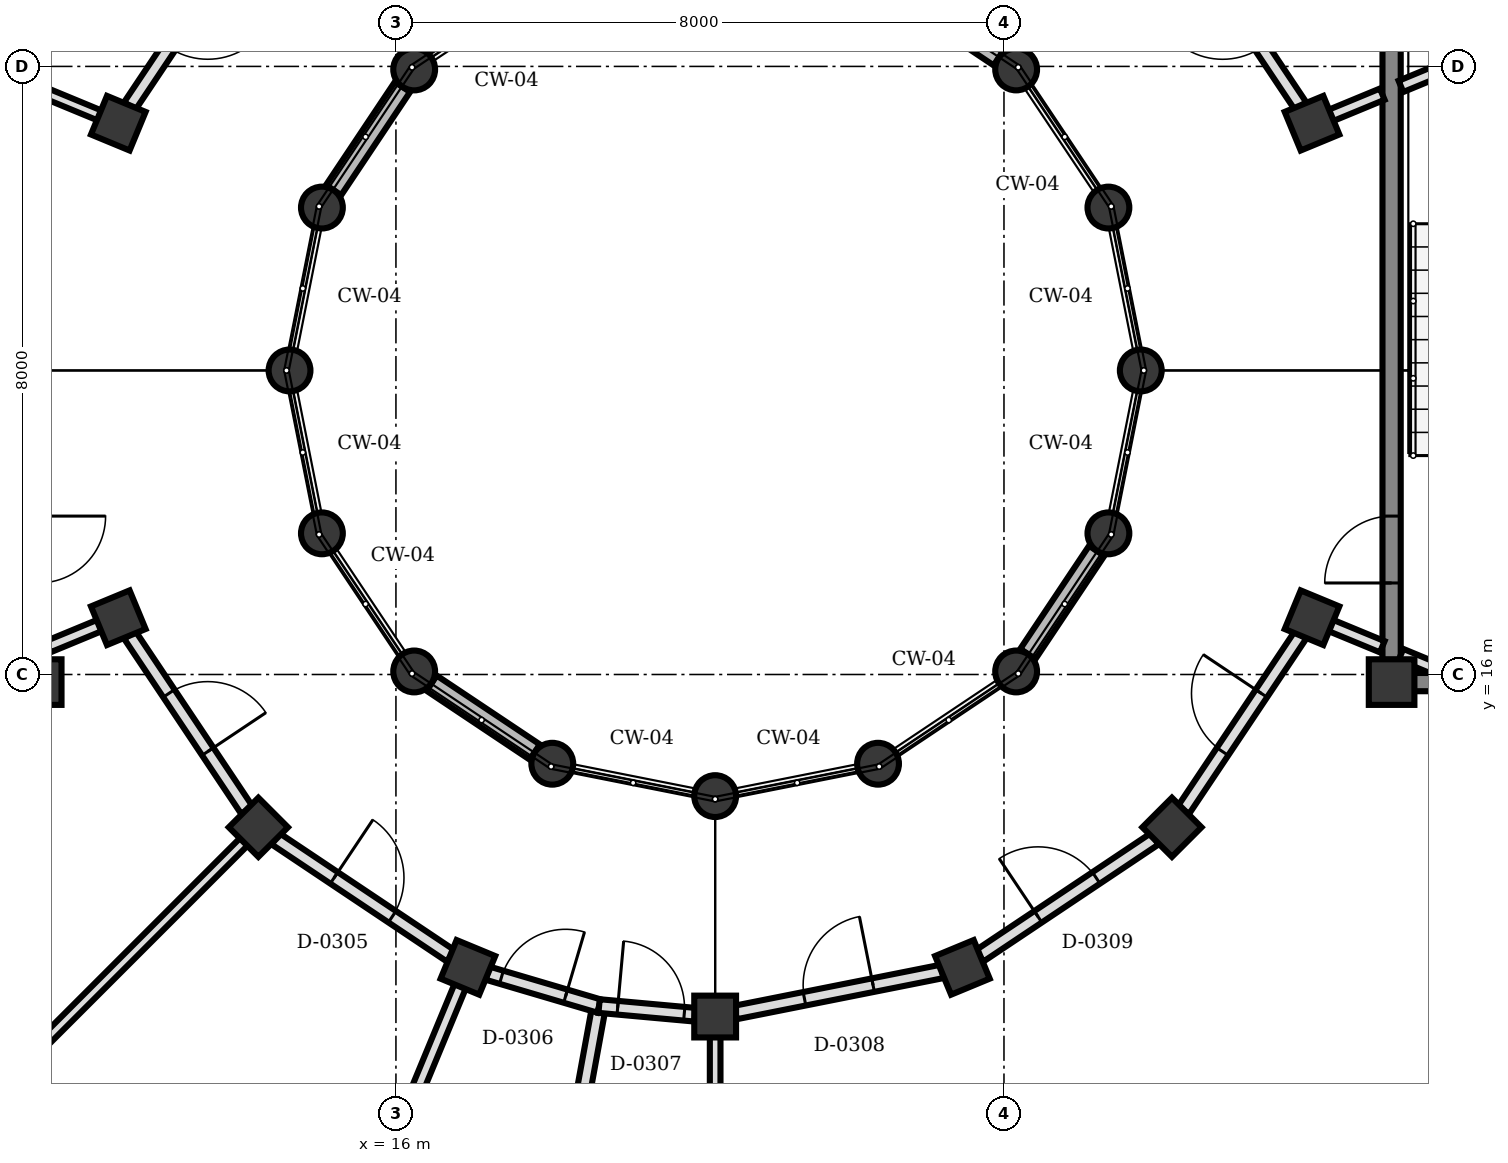
"""IFC4 building model, lengths in metres.
Left out: names, types, materials, properties, quantities, classifications, styles, units other than length and angle.
Written with IfcOpenShell. Run it as: python <this file> out.ifc"""

import sys

from ifc_helpers import new_model, si_unit, direction, frame, frame_2d, origin, origin_2d, place, context, subcontext, project, spatial, rectangle, circle, extrude, element, fill, save


model = new_model("IFC4")
c1 = context("Model", 3, precision=1e-05, world=origin(), true_north=direction((0.0, 1.0)))
c2 = subcontext(c1, "Body", "Model", "MODEL_VIEW")
j1 = project(units=[si_unit("LENGTHUNIT", "METRE"), si_unit("PLANEANGLEUNIT", "RADIAN")], contexts=[c1])
p1 = place(None, origin())
s1 = spatial("IfcSite", under=j1, at=p1, CompositionType="ELEMENT")
p2 = place(p1, origin())
s2 = spatial("IfcBuilding", under=s1, at=p2, CompositionType="ELEMENT")
p3 = place(p2, frame((0.0, 0.0, 8.5)))
s3 = spatial("IfcBuildingStorey", under=s2, at=p3, CompositionType="ELEMENT", Elevation=8.5)
for number, where, z_axis, x_axis in (
    (1, (11.3, 15.9, 0.0), (0.0, 0.0, 1.0), (1.0, 0.0, 0.0)),
    (2, (29.1, 15.9, 0.0), (0.0, 0.0, 1.0), (1.0, 0.0, 0.0)),
):
    element("IfcColumn", number, at=place(p3, frame(where, z_axis=z_axis, x_axis=x_axis)), inside=s3, PredefinedType="COLUMN", context=c2, shape_type="SweptSolid", body=[
        extrude(rectangle(XDim=0.6, YDim=0.6, at=origin_2d()), origin(), (0.0, 0.0, 1.0), 4.0),
    ])
for number, where, z_axis, x_axis in (
    (3, (25.8, 20.0, 0.0), (0.0, 0.0, 1.0), (1.0, 0.0, 0.0)),
    (4, (25.374, 22.143, 0.0), (0.0, 0.0, 1.0), (1.0, 0.0, 0.0)),
    (5, (24.16, 23.96, 0.0), (0.0, 0.0, 1.0), (1.0, 0.0, 0.0)),
    (6, (16.24, 23.96, 0.0), (0.0, 0.0, 1.0), (1.0, 0.0, 0.0)),
    (7, (15.026, 22.143, 0.0), (0.0, 0.0, 1.0), (1.0, 0.0, 0.0)),
    (8, (14.6, 20.0, 0.0), (0.0, 0.0, 1.0), (1.0, 0.0, 0.0)),
    (9, (15.026, 17.857, 0.0), (0.0, 0.0, 1.0), (1.0, 0.0, 0.0)),
    (10, (16.24, 16.04, 0.0), (0.0, 0.0, 1.0), (1.0, 0.0, 0.0)),
    (11, (18.057, 14.826, 0.0), (0.0, 0.0, 1.0), (1.0, 0.0, 0.0)),
    (12, (20.2, 14.4, 0.0), (0.0, 0.0, 1.0), (1.0, 0.0, 0.0)),
    (13, (22.343, 14.826, 0.0), (0.0, 0.0, 1.0), (1.0, 0.0, 0.0)),
    (14, (24.16, 16.04, 0.0), (0.0, 0.0, 1.0), (1.0, 0.0, 0.0)),
    (15, (25.374, 17.857, 0.0), (0.0, 0.0, 1.0), (1.0, 0.0, 0.0)),
):
    element("IfcColumn", number, at=place(p3, frame(where, z_axis=z_axis, x_axis=x_axis)), inside=s3, PredefinedType="COLUMN", context=c2, shape_type="SweptSolid", body=[
        extrude(circle(Radius=0.275, at=origin_2d()), origin(), (0.0, 0.0, 1.0), 4.0),
    ])
for number, where, z_axis, x_axis in (
    (16, (28.053, 23.253, 0.0), (0.0, 0.0, 1.0), (0.924, 0.383, 0.0)),
    (17, (12.347, 23.253, 0.0), (0.0, 0.0, 1.0), (-0.924, 0.383, 0.0)),
    (18, (12.347, 16.747, 0.0), (0.0, 0.0, 1.0), (-0.924, -0.383, 0.0)),
    (19, (14.19, 13.99, 0.0), (0.0, 0.0, 1.0), (-0.707, -0.707, 0.0)),
    (20, (16.947, 12.147, 0.0), (0.0, 0.0, 1.0), (-0.383, -0.924, 0.0)),
    (21, (20.2, 11.5, 0.0), (0.0, 0.0, 1.0), (0.0, -1.0, 0.0)),
    (22, (23.453, 12.147, 0.0), (0.0, 0.0, 1.0), (0.383, -0.924, 0.0)),
    (23, (26.21, 13.99, 0.0), (0.0, 0.0, 1.0), (0.707, -0.707, 0.0)),
    (24, (28.053, 16.747, 0.0), (0.0, 0.0, 1.0), (0.924, -0.383, 0.0)),
):
    element("IfcColumn", number, at=place(p3, frame(where, z_axis=z_axis, x_axis=x_axis)), inside=s3, PredefinedType="COLUMN", context=c2, shape_type="SweptSolid", body=[
        extrude(rectangle(XDim=0.55, YDim=0.55, at=origin_2d()), origin(), (0.0, 0.0, 1.0), 4.0),
    ])
for number, where, z_axis, x_axis in (
    (25, (23.93, 24.114, 0.0), (0.0, 0.0, 1.0), (-0.832, 0.555, 0.0)),
    (26, (16.086, 23.73, 0.0), (0.0, 0.0, 1.0), (-0.555, -0.832, 0.0)),
    (27, (16.47, 15.886, 0.0), (0.0, 0.0, 1.0), (0.832, -0.555, 0.0)),
    (28, (24.314, 16.27, 0.0), (0.0, 0.0, 1.0), (0.555, 0.832, 0.0)),
):
    element("IfcWall", number, at=place(p3, frame(where, z_axis=z_axis, x_axis=x_axis)), inside=s3, PredefinedType="SOLIDWALL", context=c2, shape_type="SweptSolid", body=[
        extrude(rectangle(XDim=1.632, YDim=0.24, at=frame_2d((0.816, 0.0))), origin(), (0.0, 0.0, 1.0), 3.222),
    ])
p4 = place(p3, frame((29.1, 16.192, 0.0), z_axis=(0.0, 0.0, 1.0), x_axis=(0.0, 1.0, 0.0)))
e29 = element("IfcWall", 29, at=p4, inside=s3, PredefinedType="SHEAR", context=c2, shape_type="SweptSolid", body=[
    extrude(rectangle(XDim=8.136, YDim=0.24, at=frame_2d((4.068, 0.0))), origin(), (0.0, 0.0, 1.0), 3.74),
])
p5 = place(p4, frame((1.012, 0.0, 0.0)))
e30 = element("IfcOpeningElement", 30, at=p5, cuts=e29, PredefinedType="OPENING", context=c2, shape_type="SweptSolid", body=[
    extrude(rectangle(XDim=0.88, YDim=2.1, at=frame_2d((0.44, 1.05))), frame((0.0, 0.13, 0.0), z_axis=(0.0, -1.0, 0.0), x_axis=(1.0, 0.0, 0.0)), (0.0, 0.0, 1.0), 0.26),
])
p6 = place(p3, frame((33.608, 15.9, 0.0), z_axis=(0.0, 0.0, 1.0), x_axis=(-1.0, 0.0, 0.0)))
e31 = element("IfcWall", 31, at=p6, inside=s3, PredefinedType="SHEAR", context=c2, shape_type="SweptSolid", body=[
    extrude(rectangle(XDim=4.216, YDim=0.24, at=frame_2d((2.108, 0.0))), origin(), (0.0, 0.0, 1.0), 3.74),
])
p7 = place(p3, frame((28.3, 23.355, 0.0), z_axis=(0.0, 0.0, 1.0), x_axis=(0.924069600435, 0.382224245113, 0.0)))
e32 = element("IfcWall", 32, at=p7, inside=s3, PredefinedType="PARTITIONING", context=c2, shape_type="SweptSolid", body=[
    extrude(rectangle(XDim=0.733, YDim=0.16, at=frame_2d((0.366, 0.0))), origin(), (0.0, 0.0, 1.0), 3.7),
])
p8 = place(p3, frame((29.223, 23.737, 0.0), z_axis=(0.0, 0.0, 1.0), x_axis=(0.923817443679, 0.382833293686, 0.0)))
e33 = element("IfcWall", 33, at=p8, inside=s3, PredefinedType="PARTITIONING", context=c2, shape_type="SweptSolid", body=[
    extrude(rectangle(XDim=1.985, YDim=0.16, at=frame_2d((0.993, 0.0))), origin(), (0.0, 0.0, 1.0), 3.7),
])
p9 = place(p3, frame((12.1, 23.355, 0.0), z_axis=(0.0, 0.0, 1.0), x_axis=(-0.924069600435, 0.382224245113, 0.0)))
e34 = element("IfcWall", 34, at=p9, inside=s3, PredefinedType="PARTITIONING", context=c2, shape_type="SweptSolid", body=[
    extrude(rectangle(XDim=0.733, YDim=0.14, at=frame_2d((0.366, 0.0))), origin(), (0.0, 0.0, 1.0), 3.7),
])
p10 = place(p3, frame((12.1, 16.645, 0.0), z_axis=(0.0, 0.0, 1.0), x_axis=(-0.924069600435, -0.382224245113, 0.0)))
e35 = element("IfcWall", 35, at=p10, inside=s3, PredefinedType="PARTITIONING", context=c2, shape_type="SweptSolid", body=[
    extrude(rectangle(XDim=0.733, YDim=0.16, at=frame_2d((0.366, 0.0))), origin(), (0.0, 0.0, 1.0), 3.072),
])
p11 = place(p3, frame((14.001, 13.801, 0.0), z_axis=(0.0, 0.0, 1.0), x_axis=(-0.707106781187, -0.707106781187, 0.0)))
e36 = element("IfcWall", 36, at=p11, inside=s3, PredefinedType="PARTITIONING", context=c2, shape_type="SweptSolid", body=[
    extrude(rectangle(XDim=8.441, YDim=0.14, at=frame_2d((4.221, 0.0))), origin(), (0.0, 0.0, 1.0), 3.072),
])
p12 = place(p3, frame((16.845, 11.9, 0.0), z_axis=(0.0, 0.0, 1.0), x_axis=(-0.382683896966, -0.923879340067, 0.0)))
e37 = element("IfcWall", 37, at=p12, inside=s3, PredefinedType="PARTITIONING", context=c2, shape_type="SweptSolid", body=[
    extrude(rectangle(XDim=8.44, YDim=0.16, at=frame_2d((4.22, 0.0))), origin(), (0.0, 0.0, 1.0), 3.072),
])
p13 = place(p3, frame((20.2, 11.233, 0.0), z_axis=(0.0, 0.0, 1.0), x_axis=(0.0, -1.0, 0.0)))
e38 = element("IfcWall", 38, at=p13, inside=s3, PredefinedType="PARTITIONING", context=c2, shape_type="SweptSolid", body=[
    extrude(rectangle(XDim=8.441, YDim=0.14, at=frame_2d((4.22, 0.0))), origin(), (0.0, 0.0, 1.0), 3.072),
])
p14 = place(p3, frame((28.3, 16.645, 0.0), z_axis=(0.0, 0.0, 1.0), x_axis=(0.924069600435, -0.382224245113, 0.0)))
e39 = element("IfcWall", 39, at=p14, inside=s3, PredefinedType="PARTITIONING", context=c2, shape_type="SweptSolid", body=[
    extrude(rectangle(XDim=0.733, YDim=0.16, at=frame_2d((0.366, 0.0))), origin(), (0.0, 0.0, 1.0), 3.072),
])
p15 = place(p3, frame((29.223, 16.263, 0.0), z_axis=(0.0, 0.0, 1.0), x_axis=(0.923812676193, -0.382844797933, 0.0)))
e40 = element("IfcWall", 40, at=p15, inside=s3, PredefinedType="PARTITIONING", context=c2, shape_type="SweptSolid", body=[
    extrude(rectangle(XDim=0.627, YDim=0.16, at=frame_2d((0.313, 0.0))), origin(), (0.0, 0.0, 1.0), 3.072),
])
p16 = place(p3, frame((18.673, 11.638, 0.0), z_axis=(0.0, 0.0, 1.0), x_axis=(-0.179734485707, -0.983715159306, 0.0)))
e41 = element("IfcWall", 41, at=p16, inside=s3, PredefinedType="PARTITIONING", context=c2, shape_type="SweptSolid", body=[
    extrude(rectangle(XDim=8.552, YDim=0.18, at=frame_2d((4.276, 0.0))), origin(), (0.0, 0.0, 1.0), 3.072),
])
p17 = place(p3, frame((27.902, 23.479, 0.0), z_axis=(0.0, 0.0, 1.0), x_axis=(-0.555797002478, 0.831318045056, 0.0)))
e42 = element("IfcWall", 42, at=p17, inside=s3, PredefinedType="PARTITIONING", context=c2, shape_type="SweptSolid", body=[
    extrude(rectangle(XDim=2.773, YDim=0.18, at=frame_2d((1.386, 0.0))), origin(), (0.0, 0.0, 1.0), 3.072),
])
p18 = place(p17, frame((0.926, 0.0, 0.0)))
e43 = element("IfcOpeningElement", 43, at=p18, cuts=e42, PredefinedType="OPENING", context=c2, shape_type="SweptSolid", body=[
    extrude(rectangle(XDim=0.92, YDim=2.1, at=frame_2d((0.46, 1.05))), frame((0.0, 0.1, 0.0), z_axis=(0.0, -1.0, 0.0), x_axis=(1.0, 0.0, 0.0)), (0.0, 0.0, 1.0), 0.2),
])
p19 = place(p3, frame((14.039, 25.784, 0.0), z_axis=(0.0, 0.0, 1.0), x_axis=(-0.555797002478, -0.831318045056, 0.0)))
e44 = element("IfcWall", 44, at=p19, inside=s3, PredefinedType="PARTITIONING", context=c2, shape_type="SweptSolid", body=[
    extrude(rectangle(XDim=2.773, YDim=0.18, at=frame_2d((1.386, 0.0))), origin(), (0.0, 0.0, 1.0), 3.072),
])
p20 = place(p19, frame((0.926, 0.0, 0.0)))
e45 = element("IfcOpeningElement", 45, at=p20, cuts=e44, PredefinedType="OPENING", context=c2, shape_type="SweptSolid", body=[
    extrude(rectangle(XDim=0.92, YDim=2.1, at=frame_2d((0.46, 1.05))), frame((0.0, 0.1, 0.0), z_axis=(0.0, -1.0, 0.0), x_axis=(1.0, 0.0, 0.0)), (0.0, 0.0, 1.0), 0.2),
])
p21 = place(p3, frame((12.498, 16.521, 0.0), z_axis=(0.0, 0.0, 1.0), x_axis=(0.555797002478, -0.831318045056, 0.0)))
e46 = element("IfcWall", 46, at=p21, inside=s3, PredefinedType="PARTITIONING", context=c2, shape_type="SweptSolid", body=[
    extrude(rectangle(XDim=2.773, YDim=0.18, at=frame_2d((1.386, 0.0))), origin(), (0.0, 0.0, 1.0), 3.072),
])
p22 = place(p21, frame((0.926, 0.0, 0.0)))
e47 = element("IfcOpeningElement", 47, at=p22, cuts=e46, PredefinedType="OPENING", context=c2, shape_type="SweptSolid", body=[
    extrude(rectangle(XDim=0.92, YDim=2.1, at=frame_2d((0.46, 1.05))), frame((0.0, 0.1, 0.0), z_axis=(0.0, -1.0, 0.0), x_axis=(1.0, 0.0, 0.0)), (0.0, 0.0, 1.0), 0.2),
])
p23 = place(p3, frame((14.416, 13.839, 0.0), z_axis=(0.0, 0.0, 1.0), x_axis=(0.831318045056, -0.555797002478, 0.0)))
e48 = element("IfcWall", 48, at=p23, inside=s3, PredefinedType="PARTITIONING", context=c2, shape_type="SweptSolid", body=[
    extrude(rectangle(XDim=2.773, YDim=0.18, at=frame_2d((1.386, 0.0))), origin(), (0.0, 0.0, 1.0), 3.072),
])
p24 = place(p23, frame((0.926, 0.0, 0.0)))
e49 = element("IfcOpeningElement", 49, at=p24, cuts=e48, PredefinedType="OPENING", context=c2, shape_type="SweptSolid", body=[
    extrude(rectangle(XDim=0.92, YDim=2.1, at=frame_2d((0.46, 1.05))), frame((0.0, 0.1, 0.0), z_axis=(0.0, -1.0, 0.0), x_axis=(1.0, 0.0, 0.0)), (0.0, 0.0, 1.0), 0.2),
])
p25 = place(p3, frame((17.205, 12.071, 0.0), z_axis=(0.0, 0.0, 1.0), x_axis=(0.959128949513, -0.282969359128, 0.0)))
e50 = element("IfcWall", 50, at=p25, inside=s3, PredefinedType="PARTITIONING", context=c2, shape_type="SweptSolid", body=[
    extrude(rectangle(XDim=1.531, YDim=0.18, at=frame_2d((0.765, 0.0))), origin(), (0.0, 0.0, 1.0), 3.072),
])
p26 = place(p25, frame((0.191, 0.0, 0.0)))
e51 = element("IfcOpeningElement", 51, at=p26, cuts=e50, PredefinedType="OPENING", context=c2, shape_type="SweptSolid", body=[
    extrude(rectangle(XDim=0.88, YDim=2.1, at=frame_2d((0.44, 1.05))), frame((0.0, 0.1, 0.0), z_axis=(0.0, -1.0, 0.0), x_axis=(1.0, 0.0, 0.0)), (0.0, 0.0, 1.0), 0.2),
])
p27 = place(p3, frame((18.673, 11.638, 0.0), z_axis=(0.0, 0.0, 1.0), x_axis=(0.995931080725, -0.090118158244, 0.0)))
e52 = element("IfcWall", 52, at=p27, inside=s3, PredefinedType="PARTITIONING", context=c2, shape_type="SweptSolid", body=[
    extrude(rectangle(XDim=1.265, YDim=0.18, at=frame_2d((0.633, 0.0))), origin(), (0.0, 0.0, 1.0), 3.072),
])
p28 = place(p27, frame((0.245, 0.0, 0.0)))
e53 = element("IfcOpeningElement", 53, at=p28, cuts=e52, PredefinedType="OPENING", context=c2, shape_type="SweptSolid", body=[
    extrude(rectangle(XDim=0.88, YDim=2.1, at=frame_2d((0.44, 1.05))), frame((0.0, 0.1, 0.0), z_axis=(0.0, -1.0, 0.0), x_axis=(1.0, 0.0, 0.0)), (0.0, 0.0, 1.0), 0.2),
])
p29 = place(p3, frame((20.467, 11.553, 0.0), z_axis=(0.0, 0.0, 1.0), x_axis=(0.980773264811, 0.195150718759, 0.0)))
e54 = element("IfcWall", 54, at=p29, inside=s3, PredefinedType="PARTITIONING", context=c2, shape_type="SweptSolid", body=[
    extrude(rectangle(XDim=2.772, YDim=0.18, at=frame_2d((1.386, 0.0))), origin(), (0.0, 0.0, 1.0), 3.072),
])
p30 = place(p29, frame((0.926, 0.0, 0.0)))
e55 = element("IfcOpeningElement", 55, at=p30, cuts=e54, PredefinedType="OPENING", context=c2, shape_type="SweptSolid", body=[
    extrude(rectangle(XDim=0.92, YDim=2.1, at=frame_2d((0.46, 1.05))), frame((0.0, 0.1, 0.0), z_axis=(0.0, -1.0, 0.0), x_axis=(1.0, 0.0, 0.0)), (0.0, 0.0, 1.0), 0.2),
])
p31 = place(p3, frame((23.679, 12.298, 0.0), z_axis=(0.0, 0.0, 1.0), x_axis=(0.831318045056, 0.555797002478, 0.0)))
e56 = element("IfcWall", 56, at=p31, inside=s3, PredefinedType="PARTITIONING", context=c2, shape_type="SweptSolid", body=[
    extrude(rectangle(XDim=2.773, YDim=0.18, at=frame_2d((1.386, 0.0))), origin(), (0.0, 0.0, 1.0), 3.072),
])
p32 = place(p31, frame((0.926, 0.0, 0.0)))
e57 = element("IfcOpeningElement", 57, at=p32, cuts=e56, PredefinedType="OPENING", context=c2, shape_type="SweptSolid", body=[
    extrude(rectangle(XDim=0.92, YDim=2.1, at=frame_2d((0.46, 1.05))), frame((0.0, 0.1, 0.0), z_axis=(0.0, -1.0, 0.0), x_axis=(1.0, 0.0, 0.0)), (0.0, 0.0, 1.0), 0.2),
])
p33 = place(p3, frame((26.361, 14.216, 0.0), z_axis=(0.0, 0.0, 1.0), x_axis=(0.555797002478, 0.831318045056, 0.0)))
e58 = element("IfcWall", 58, at=p33, inside=s3, PredefinedType="PARTITIONING", context=c2, shape_type="SweptSolid", body=[
    extrude(rectangle(XDim=2.773, YDim=0.18, at=frame_2d((1.386, 0.0))), origin(), (0.0, 0.0, 1.0), 3.072),
])
p34 = place(p33, frame((0.926, 0.0, 0.0)))
e59 = element("IfcOpeningElement", 59, at=p34, cuts=e58, PredefinedType="OPENING", context=c2, shape_type="SweptSolid", body=[
    extrude(rectangle(XDim=0.92, YDim=2.1, at=frame_2d((0.46, 1.05))), frame((0.0, 0.1, 0.0), z_axis=(0.0, -1.0, 0.0), x_axis=(1.0, 0.0, 0.0)), (0.0, 0.0, 1.0), 0.2),
])
p35 = place(p5, origin())
e60 = element("IfcDoor", 60, at=p35, inside=s3, OperationType="SINGLE_SWING_LEFT", PredefinedType="DOOR", context=c2, shape_type="SweptSolid", body=[
    extrude(rectangle(XDim=0.88, YDim=2.1, at=frame_2d((0.44, 1.05))), frame((0.0, 0.025, 0.0), z_axis=(0.0, -1.0, 0.0), x_axis=(1.0, 0.0, 0.0)), (0.0, 0.0, 1.0), 0.05),
])
fill(e30, e60)
p36 = place(p22, origin())
e61 = element("IfcDoor", 61, at=p36, inside=s3, OperationType="SINGLE_SWING_RIGHT", PredefinedType="DOOR", context=c2, shape_type="SweptSolid", body=[
    extrude(rectangle(XDim=0.92, YDim=2.1, at=frame_2d((0.46, 1.05))), frame((0.0, 0.025, 0.0), z_axis=(0.0, -1.0, 0.0), x_axis=(1.0, 0.0, 0.0)), (0.0, 0.0, 1.0), 0.05),
])
fill(e47, e61)
p37 = place(p24, origin())
e62 = element("IfcDoor", 62, at=p37, inside=s3, OperationType="SINGLE_SWING_LEFT", PredefinedType="DOOR", context=c2, shape_type="SweptSolid", body=[
    extrude(rectangle(XDim=0.92, YDim=2.1, at=frame_2d((0.46, 1.05))), frame((0.0, 0.025, 0.0), z_axis=(0.0, -1.0, 0.0), x_axis=(1.0, 0.0, 0.0)), (0.0, 0.0, 1.0), 0.05),
])
fill(e49, e62)
p38 = place(p26, origin())
e63 = element("IfcDoor", 63, at=p38, inside=s3, OperationType="SINGLE_SWING_RIGHT", PredefinedType="DOOR", context=c2, shape_type="SweptSolid", body=[
    extrude(rectangle(XDim=0.88, YDim=2.1, at=frame_2d((0.44, 1.05))), frame((0.0, 0.025, 0.0), z_axis=(0.0, -1.0, 0.0), x_axis=(1.0, 0.0, 0.0)), (0.0, 0.0, 1.0), 0.05),
])
fill(e51, e63)
p39 = place(p28, origin())
e64 = element("IfcDoor", 64, at=p39, inside=s3, OperationType="SINGLE_SWING_LEFT", PredefinedType="DOOR", context=c2, shape_type="SweptSolid", body=[
    extrude(rectangle(XDim=0.88, YDim=2.1, at=frame_2d((0.44, 1.05))), frame((0.0, 0.025, 0.0), z_axis=(0.0, -1.0, 0.0), x_axis=(1.0, 0.0, 0.0)), (0.0, 0.0, 1.0), 0.05),
])
fill(e53, e64)
p40 = place(p30, origin())
e65 = element("IfcDoor", 65, at=p40, inside=s3, OperationType="SINGLE_SWING_RIGHT", PredefinedType="DOOR", context=c2, shape_type="SweptSolid", body=[
    extrude(rectangle(XDim=0.92, YDim=2.1, at=frame_2d((0.46, 1.05))), frame((0.0, 0.025, 0.0), z_axis=(0.0, -1.0, 0.0), x_axis=(1.0, 0.0, 0.0)), (0.0, 0.0, 1.0), 0.05),
])
fill(e55, e65)
p41 = place(p32, origin())
e66 = element("IfcDoor", 66, at=p41, inside=s3, OperationType="SINGLE_SWING_LEFT", PredefinedType="DOOR", context=c2, shape_type="SweptSolid", body=[
    extrude(rectangle(XDim=0.92, YDim=2.1, at=frame_2d((0.46, 1.05))), frame((0.0, 0.025, 0.0), z_axis=(0.0, -1.0, 0.0), x_axis=(1.0, 0.0, 0.0)), (0.0, 0.0, 1.0), 0.05),
])
fill(e57, e66)
p42 = place(p34, origin())
e67 = element("IfcDoor", 67, at=p42, inside=s3, OperationType="SINGLE_SWING_RIGHT", PredefinedType="DOOR", context=c2, shape_type="SweptSolid", body=[
    extrude(rectangle(XDim=0.92, YDim=2.1, at=frame_2d((0.46, 1.05))), frame((0.0, 0.025, 0.0), z_axis=(0.0, -1.0, 0.0), x_axis=(1.0, 0.0, 0.0)), (0.0, 0.0, 1.0), 0.05),
])
fill(e59, e67)
save(model, sys.argv[1])
